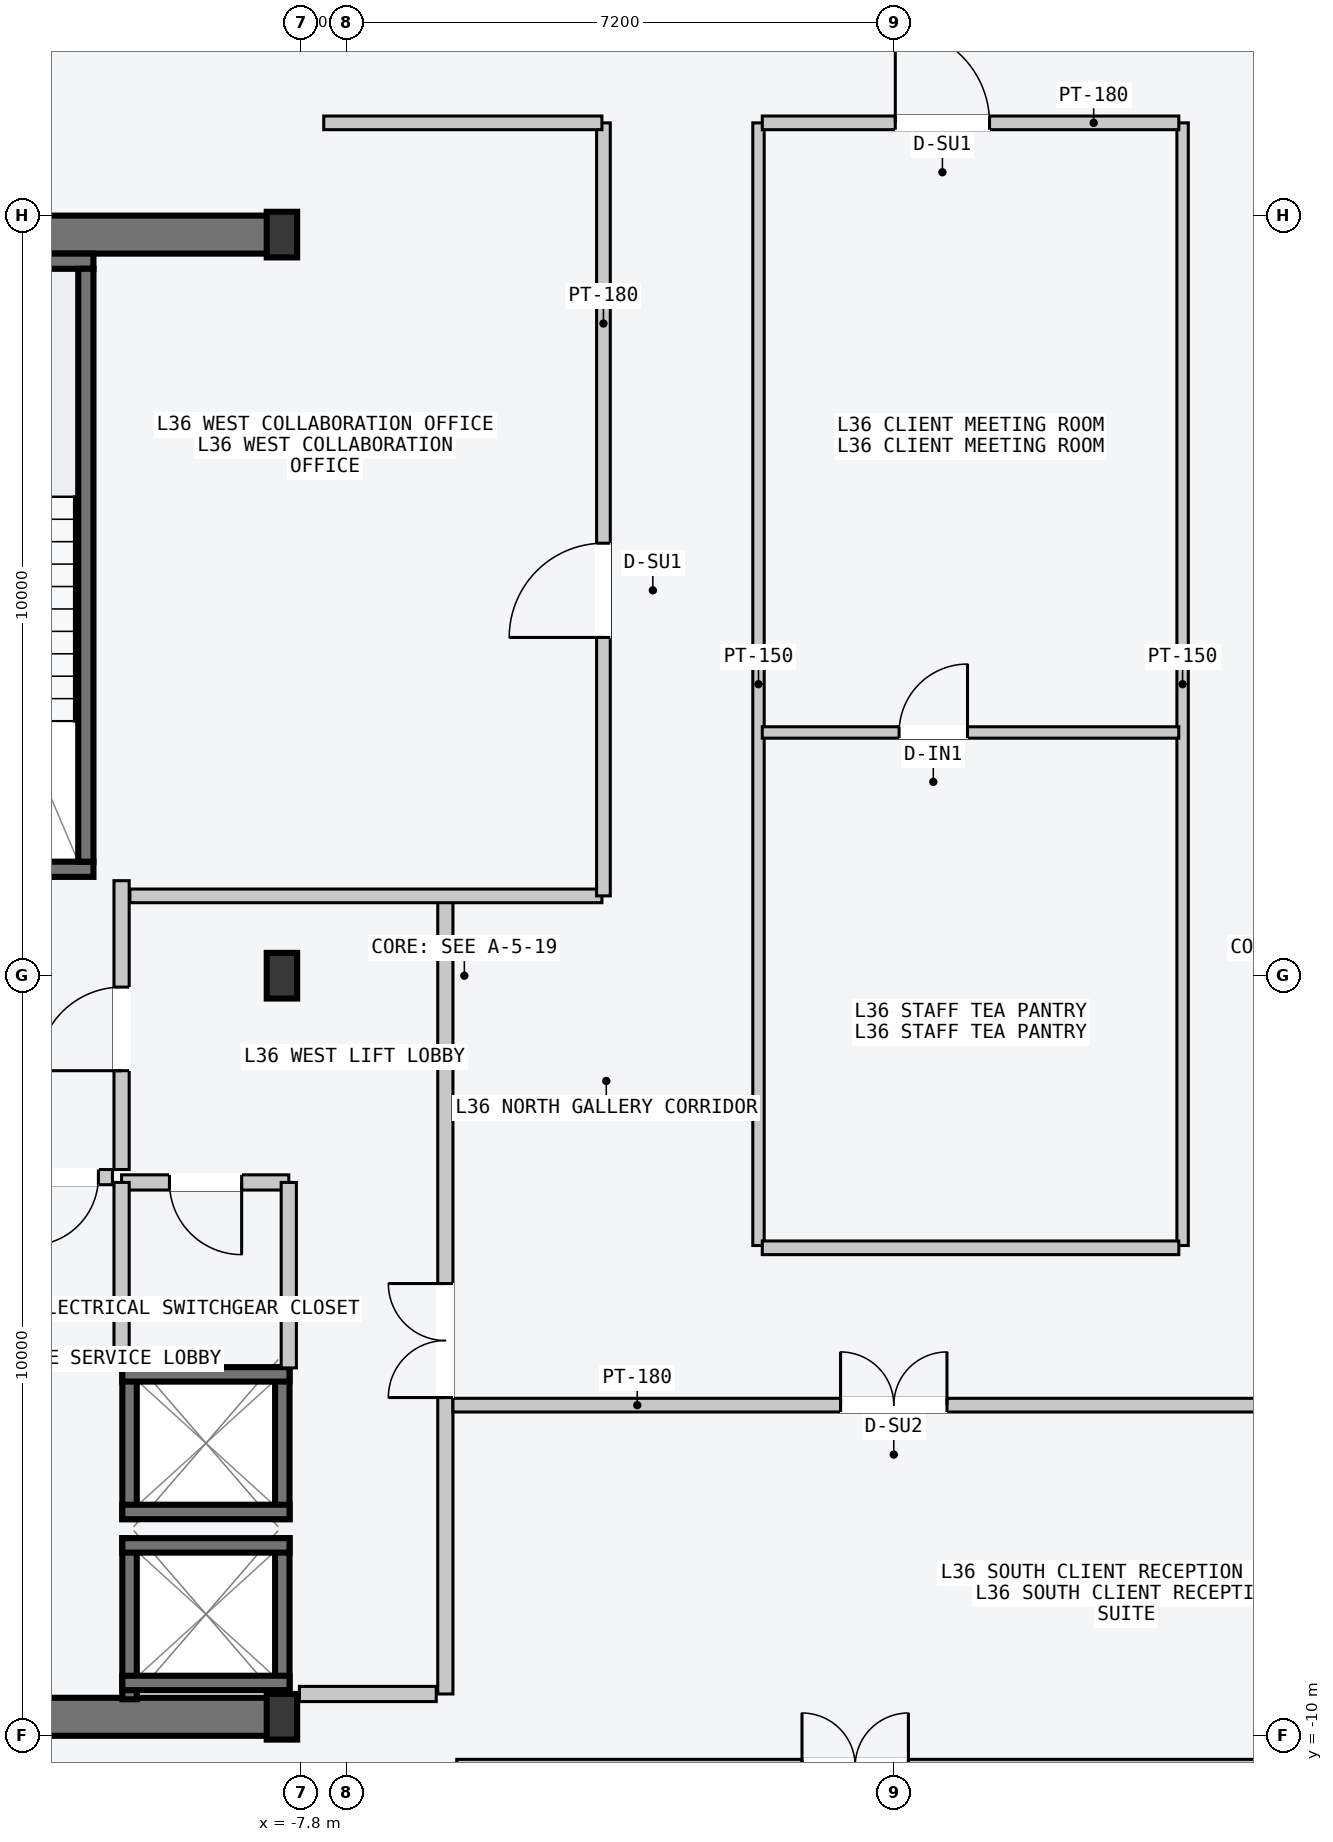
"""IFC4 building model, lengths in metres.
Left out: names, types, materials, properties, quantities, classifications, styles, units other than length and angle.
Written with IfcOpenShell. Run it as: python <this file> out.ifc"""

import sys

from ifc_helpers import new_model, si_unit, direction, frame, frame_2d, origin, origin_2d, place, context, subcontext, project, spatial, rectangle, i_section, extrude, element, fill, save


model = new_model("IFC4")
c1 = context("Model", 3, precision=1e-05, world=origin(), true_north=direction((0.0, 1.0)))
c2 = subcontext(c1, "Body", "Model", "MODEL_VIEW")
j1 = project(units=[si_unit("LENGTHUNIT", "METRE"), si_unit("PLANEANGLEUNIT", "RADIAN")], contexts=[c1])
p1 = place(None, origin())
s1 = spatial("IfcSite", under=j1, at=p1, CompositionType="ELEMENT")
p2 = place(p1, origin())
s2 = spatial("IfcBuilding", under=s1, at=p2, CompositionType="ELEMENT")
p3 = place(p2, frame((0.0, 0.0, 138.6)))
s3 = spatial("IfcBuildingStorey", under=s2, at=p3, CompositionType="ELEMENT", Elevation=138.6)
for number, where, z_axis, x_axis in (
    (1, (-14.53, -9.75, -0.2), (0.0, 0.0, 1.0), (1.0, 0.0, 0.0)),
    (2, (-14.53, 9.75, -0.2), (0.0, 0.0, 1.0), (1.0, 0.0, 0.0)),
):
    element("IfcWall", number, at=place(p3, frame(where, z_axis=z_axis, x_axis=x_axis)), inside=s3, PredefinedType="SHEAR", context=c2, shape_type="SweptSolid", body=[
        extrude(rectangle(XDim=6.46, YDim=0.5, at=frame_2d((3.23, 0.0))), origin(), (0.0, 0.0, 1.0), 3.6),
    ])
p4 = place(p3, frame((-14.25, 1.4, -0.2), z_axis=(0.0, 0.0, 1.0), x_axis=(1.0, 0.0, 0.0)))
e3 = element("IfcWall", 3, at=p4, inside=s3, PredefinedType="SOLIDWALL", context=c2, shape_type="SweptSolid", body=[
    extrude(rectangle(XDim=3.72, YDim=0.2, at=frame_2d((1.86, 0.0))), origin(), (0.0, 0.0, 1.0), 3.6),
])
p5 = place(p4, frame((1.5, 0.0, 0.2)))
e4 = element("IfcOpeningElement", 4, at=p5, cuts=e3, PredefinedType="OPENING", context=c2, shape_type="SweptSolid", body=[
    extrude(rectangle(XDim=1.12, YDim=2.18, at=frame_2d((0.56, 1.09))), frame((0.0, 0.11, 0.0), z_axis=(0.0, -1.0, 0.0), x_axis=(1.0, 0.0, 0.0)), (0.0, 0.0, 1.0), 0.22),
])
p6 = place(p3, frame((-14.25, 9.4, -0.2), z_axis=(0.0, 0.0, 1.0), x_axis=(1.0, 0.0, 0.0)))
e5 = element("IfcWall", 5, at=p6, inside=s3, PredefinedType="SOLIDWALL", context=c2, shape_type="SweptSolid", body=[
    extrude(rectangle(XDim=3.72, YDim=0.2, at=frame_2d((1.86, 0.0))), origin(), (0.0, 0.0, 1.0), 3.6),
])
p7 = place(p3, frame((-10.63, 1.5, -0.2), z_axis=(0.0, 0.0, 1.0), x_axis=(0.0, 1.0, 0.0)))
e6 = element("IfcWall", 6, at=p7, inside=s3, PredefinedType="SOLIDWALL", context=c2, shape_type="SweptSolid", body=[
    extrude(rectangle(XDim=7.8, YDim=0.2, at=frame_2d((3.9, 0.0))), origin(), (0.0, 0.0, 1.0), 3.6),
])
for number, where, z_axis, x_axis in (
    (7, (-8.05, -9.75, 0.0), (0.0, 0.0, 1.0), (1.0, 0.0, 0.0)),
    (8, (-8.05, 0.0, 0.0), (0.0, 0.0, 1.0), (1.0, 0.0, 0.0)),
    (9, (-8.05, 9.75, 0.0), (0.0, 0.0, 1.0), (1.0, 0.0, 0.0)),
):
    element("IfcColumn", number, at=place(p3, frame(where, z_axis=z_axis, x_axis=x_axis)), inside=s3, PredefinedType="COLUMN", context=c2, shape_type="SweptSolid", body=[
        extrude(i_section(OverallWidth=0.4, OverallDepth=0.6, WebThickness=0.022, FlangeThickness=0.036, at=origin_2d()), origin(), (0.0, 0.0, 1.0), 3.6),
    ])
for number, where, z_axis, x_axis in (
    (10, (-8.045, -9.52, -0.2), (0.0, 0.0, 1.0), (0.0, 1.0, 0.0)),
    (11, (-10.055, -9.52, -0.2), (0.0, 0.0, 1.0), (0.0, 1.0, 0.0)),
):
    element("IfcWall", number, at=place(p3, frame(where, z_axis=z_axis, x_axis=x_axis)), inside=s3, PredefinedType="SOLIDWALL", context=c2, shape_type="SweptSolid", body=[
        extrude(rectangle(XDim=2.12, YDim=0.19, at=frame_2d((1.06, 0.0))), origin(), (0.0, 0.0, 1.0), 3.6),
    ])
for number, where, z_axis, x_axis in (
    (12, (-10.15, -7.495, -0.2), (0.0, 0.0, 1.0), (1.0, 0.0, 0.0)),
    (13, (-10.15, -9.305, -0.2), (0.0, 0.0, 1.0), (1.0, 0.0, 0.0)),
):
    element("IfcWall", number, at=place(p3, frame(where, z_axis=z_axis, x_axis=x_axis)), inside=s3, PredefinedType="SOLIDWALL", context=c2, shape_type="SweptSolid", body=[
        extrude(rectangle(XDim=2.2, YDim=0.19, at=frame_2d((1.1, 0.0))), origin(), (0.0, 0.0, 1.0), 3.6),
    ])
for number, where, z_axis, x_axis in (
    (14, (-8.045, -7.15, -0.2), (0.0, 0.0, 1.0), (0.0, 1.0, 0.0)),
    (15, (-10.055, -7.15, -0.2), (0.0, 0.0, 1.0), (0.0, 1.0, 0.0)),
):
    element("IfcWall", number, at=place(p3, frame(where, z_axis=z_axis, x_axis=x_axis)), inside=s3, PredefinedType="SOLIDWALL", context=c2, shape_type="SweptSolid", body=[
        extrude(rectangle(XDim=2.0, YDim=0.19, at=frame_2d((1.0, 0.0))), origin(), (0.0, 0.0, 1.0), 3.6),
    ])
for number, where, z_axis, x_axis in (
    (16, (-10.15, -5.245, -0.2), (0.0, 0.0, 1.0), (1.0, 0.0, 0.0)),
    (17, (-10.15, -7.055, -0.2), (0.0, 0.0, 1.0), (1.0, 0.0, 0.0)),
):
    element("IfcWall", number, at=place(p3, frame(where, z_axis=z_axis, x_axis=x_axis)), inside=s3, PredefinedType="SOLIDWALL", context=c2, shape_type="SweptSolid", body=[
        extrude(rectangle(XDim=2.2, YDim=0.19, at=frame_2d((1.1, 0.0))), origin(), (0.0, 0.0, 1.0), 3.6),
    ])
p8 = place(p3, frame((-5.9, -9.45, 0.0), z_axis=(0.0, 0.0, 1.0), x_axis=(0.0, 1.0, 0.0)))
e18 = element("IfcWall", 18, at=p8, inside=s3, PredefinedType="PARTITIONING", context=c2, shape_type="SweptSolid", body=[
    extrude(rectangle(XDim=10.5, YDim=0.2, at=frame_2d((5.25, 0.0))), origin(), (0.0, 0.0, 1.0), 3.4),
])
p9 = place(p8, frame((3.9, 0.0, 0.0)))
e19 = element("IfcOpeningElement", 19, at=p9, cuts=e18, PredefinedType="OPENING", context=c2, shape_type="SweptSolid", body=[
    extrude(rectangle(XDim=1.5, YDim=2.2, at=frame_2d((0.75, 1.1))), frame((0.0, 0.11, 0.0), z_axis=(0.0, -1.0, 0.0), x_axis=(1.0, 0.0, 0.0)), (0.0, 0.0, 1.0), 0.22),
])
p10 = place(p3, frame((-6.02, -9.45, 0.0), z_axis=(0.0, 0.0, 1.0), x_axis=(-1.0, 0.0, 0.0)))
e20 = element("IfcWall", 20, at=p10, inside=s3, PredefinedType="PARTITIONING", context=c2, shape_type="SweptSolid", body=[
    extrude(rectangle(XDim=1.8, YDim=0.2, at=frame_2d((0.9, 0.0))), origin(), (0.0, 0.0, 1.0), 3.4),
])
p11 = place(p3, frame((-10.16, -2.55, 0.0), z_axis=(0.0, 0.0, 1.0), x_axis=(0.0, 1.0, 0.0)))
e21 = element("IfcWall", 21, at=p11, inside=s3, PredefinedType="PARTITIONING", context=c2, shape_type="SweptSolid", body=[
    extrude(rectangle(XDim=3.8, YDim=0.2, at=frame_2d((1.9, 0.0))), origin(), (0.0, 0.0, 1.0), 3.4),
])
p12 = place(p11, frame((1.3, 0.0, 0.0)))
e22 = element("IfcOpeningElement", 22, at=p12, cuts=e21, PredefinedType="OPENING", context=c2, shape_type="SweptSolid", body=[
    extrude(rectangle(XDim=1.1, YDim=2.15, at=frame_2d((0.55, 1.075))), frame((0.0, 0.11, 0.0), z_axis=(0.0, -1.0, 0.0), x_axis=(1.0, 0.0, 0.0)), (0.0, 0.0, 1.0), 0.22),
])
p13 = place(p3, frame((-10.28, -2.65, 0.0), z_axis=(0.0, 0.0, 1.0), x_axis=(-1.0, 0.0, 0.0)))
e23 = element("IfcWall", 23, at=p13, inside=s3, PredefinedType="PARTITIONING", context=c2, shape_type="SweptSolid", body=[
    extrude(rectangle(XDim=1.27, YDim=0.2, at=frame_2d((0.635, 0.0))), origin(), (0.0, 0.0, 1.0), 3.4),
])
p14 = place(p13, frame((0.185, 0.0, 0.0)))
e24 = element("IfcOpeningElement", 24, at=p14, cuts=e23, PredefinedType="OPENING", context=c2, shape_type="SweptSolid", body=[
    extrude(rectangle(XDim=0.9, YDim=2.15, at=frame_2d((0.45, 1.075))), frame((0.0, 0.11, 0.0), z_axis=(0.0, -1.0, 0.0), x_axis=(1.0, 0.0, 0.0)), (0.0, 0.0, 1.0), 0.22),
])
p15 = place(p3, frame((-7.96, -2.72, 0.0), z_axis=(0.0, 0.0, 1.0), x_axis=(-1.0, 0.0, 0.0)))
e25 = element("IfcWall", 25, at=p15, inside=s3, PredefinedType="PARTITIONING", context=c2, shape_type="SweptSolid", body=[
    extrude(rectangle(XDim=2.2, YDim=0.2, at=frame_2d((1.1, 0.0))), origin(), (0.0, 0.0, 1.0), 3.4),
])
p16 = place(p15, frame((0.62, 0.0, 0.0)))
e26 = element("IfcOpeningElement", 26, at=p16, cuts=e25, PredefinedType="OPENING", context=c2, shape_type="SweptSolid", body=[
    extrude(rectangle(XDim=0.95, YDim=2.1, at=frame_2d((0.475, 1.05))), frame((0.0, 0.11, 0.0), z_axis=(0.0, -1.0, 0.0), x_axis=(1.0, 0.0, 0.0)), (0.0, 0.0, 1.0), 0.22),
])
for number, where, z_axis, x_axis in (
    (27, (-7.96, -5.16, 0.0), (0.0, 0.0, 1.0), (0.0, 1.0, 0.0)),
    (28, (-10.16, -5.16, 0.0), (0.0, 0.0, 1.0), (0.0, 1.0, 0.0)),
):
    element("IfcWall", number, at=place(p3, frame(where, z_axis=z_axis, x_axis=x_axis)), inside=s3, PredefinedType="PARTITIONING", context=c2, shape_type="SweptSolid", body=[
        extrude(rectangle(XDim=2.44, YDim=0.2, at=frame_2d((1.22, 0.0))), origin(), (0.0, 0.0, 1.0), 3.4),
    ])
p17 = place(p3, frame((-10.05, 1.05, 0.0), z_axis=(0.0, 0.0, 1.0), x_axis=(1.0, 0.0, 0.0)))
e29 = element("IfcWall", 29, at=p17, inside=s3, PredefinedType="PARTITIONING", context=c2, shape_type="SweptSolid", body=[
    extrude(rectangle(XDim=6.21, YDim=0.18, at=frame_2d((3.105, 0.0))), origin(), (0.0, 0.0, 1.0), 3.4),
])
p18 = place(p3, frame((-3.82, 1.05, 0.0), z_axis=(0.0, 0.0, 1.0), x_axis=(0.0, 1.0, 0.0)))
e30 = element("IfcWall", 30, at=p18, inside=s3, PredefinedType="PARTITIONING", context=c2, shape_type="SweptSolid", body=[
    extrude(rectangle(XDim=10.17, YDim=0.18, at=frame_2d((5.085, 0.0))), origin(), (0.0, 0.0, 1.0), 3.4),
])
p19 = place(p18, frame((3.4, 0.0, 0.0)))
e31 = element("IfcOpeningElement", 31, at=p19, cuts=e30, PredefinedType="OPENING", context=c2, shape_type="SweptSolid", body=[
    extrude(rectangle(XDim=1.24, YDim=2.24, at=frame_2d((0.62, 1.12))), frame((0.0, 0.1, 0.0), z_axis=(0.0, -1.0, 0.0), x_axis=(1.0, 0.0, 0.0)), (0.0, 0.0, 1.0), 0.2),
])
p20 = place(p3, frame((-7.5, 11.22, 0.0), z_axis=(0.0, 0.0, 1.0), x_axis=(1.0, 0.0, 0.0)))
e32 = element("IfcWall", 32, at=p20, inside=s3, PredefinedType="PARTITIONING", context=c2, shape_type="SweptSolid", body=[
    extrude(rectangle(XDim=3.66, YDim=0.18, at=frame_2d((1.83, 0.0))), origin(), (0.0, 0.0, 1.0), 3.4),
])
for number, where, z_axis, x_axis in (
    (33, (-1.78, -3.55, 0.0), (0.0, 0.0, 1.0), (0.0, 1.0, 0.0)),
    (34, (3.8, -3.55, 0.0), (0.0, 0.0, 1.0), (0.0, 1.0, 0.0)),
):
    element("IfcWall", number, at=place(p3, frame(where, z_axis=z_axis, x_axis=x_axis)), inside=s3, PredefinedType="PARTITIONING", context=c2, shape_type="SweptSolid", body=[
        extrude(rectangle(XDim=14.77, YDim=0.15, at=frame_2d((7.385, 0.0))), origin(), (0.0, 0.0, 1.0), 3.4),
    ])
p21 = place(p3, frame((-1.73, -3.58, 0.0), z_axis=(0.0, 0.0, 1.0), x_axis=(1.0, 0.0, 0.0)))
e35 = element("IfcWall", 35, at=p21, inside=s3, PredefinedType="PARTITIONING", context=c2, shape_type="SweptSolid", body=[
    extrude(rectangle(XDim=5.48, YDim=0.18, at=frame_2d((2.74, 0.0))), origin(), (0.0, 0.0, 1.0), 3.4),
])
p22 = place(p3, frame((-1.73, 3.2, 0.0), z_axis=(0.0, 0.0, 1.0), x_axis=(1.0, 0.0, 0.0)))
e36 = element("IfcWall", 36, at=p22, inside=s3, PredefinedType="PARTITIONING", context=c2, shape_type="SweptSolid", body=[
    extrude(rectangle(XDim=5.48, YDim=0.15, at=frame_2d((2.74, 0.0))), origin(), (0.0, 0.0, 1.0), 3.4),
])
p23 = place(p22, frame((1.8, 0.0, 0.0)))
e37 = element("IfcOpeningElement", 37, at=p23, cuts=e36, PredefinedType="OPENING", context=c2, shape_type="SweptSolid", body=[
    extrude(rectangle(XDim=0.9, YDim=2.15, at=frame_2d((0.45, 1.075))), frame((0.0, 0.085, 0.0), z_axis=(0.0, -1.0, 0.0), x_axis=(1.0, 0.0, 0.0)), (0.0, 0.0, 1.0), 0.17),
])
p24 = place(p3, frame((-1.73, 11.22, 0.0), z_axis=(0.0, 0.0, 1.0), x_axis=(1.0, 0.0, 0.0)))
e38 = element("IfcWall", 38, at=p24, inside=s3, PredefinedType="PARTITIONING", context=c2, shape_type="SweptSolid", body=[
    extrude(rectangle(XDim=5.48, YDim=0.18, at=frame_2d((2.74, 0.0))), origin(), (0.0, 0.0, 1.0), 3.4),
])
p25 = place(p24, frame((1.75, 0.0, 0.0)))
e39 = element("IfcOpeningElement", 39, at=p25, cuts=e38, PredefinedType="OPENING", context=c2, shape_type="SweptSolid", body=[
    extrude(rectangle(XDim=1.24, YDim=2.24, at=frame_2d((0.62, 1.12))), frame((0.0, 0.1, 0.0), z_axis=(0.0, -1.0, 0.0), x_axis=(1.0, 0.0, 0.0)), (0.0, 0.0, 1.0), 0.2),
])
p26 = place(p3, frame((-5.8, -5.65, 0.0), z_axis=(0.0, 0.0, 1.0), x_axis=(1.0, 0.0, 0.0)))
e40 = element("IfcWall", 40, at=p26, inside=s3, PredefinedType="PARTITIONING", context=c2, shape_type="SweptSolid", body=[
    extrude(rectangle(XDim=11.6, YDim=0.18, at=frame_2d((5.8, 0.0))), origin(), (0.0, 0.0, 1.0), 3.4),
])
p27 = place(p26, frame((5.1, 0.0, 0.0)))
e41 = element("IfcOpeningElement", 41, at=p27, cuts=e40, PredefinedType="OPENING", context=c2, shape_type="SweptSolid", body=[
    extrude(rectangle(XDim=1.4, YDim=2.2, at=frame_2d((0.7, 1.1))), frame((0.0, 0.1, 0.0), z_axis=(0.0, -1.0, 0.0), x_axis=(1.0, 0.0, 0.0)), (0.0, 0.0, 1.0), 0.2),
])
p28 = place(p3, frame((-5.75, -10.4, 0.0), z_axis=(0.0, 0.0, 1.0), x_axis=(1.0, 0.0, 0.0)))
e42 = element("IfcWall", 42, at=p28, inside=s3, PredefinedType="PARTITIONING", context=c2, shape_type="SweptSolid", body=[
    extrude(rectangle(XDim=11.5, YDim=0.18, at=frame_2d((5.75, 0.0))), origin(), (0.0, 0.0, 1.0), 3.4),
])
p29 = place(p28, frame((4.542, 0.0, 0.0)))
e43 = element("IfcOpeningElement", 43, at=p29, cuts=e42, PredefinedType="OPENING", context=c2, shape_type="SweptSolid", body=[
    extrude(rectangle(XDim=1.4, YDim=2.2, at=frame_2d((0.7, 1.1))), frame((0.0, 0.1, 0.0), z_axis=(0.0, -1.0, 0.0), x_axis=(1.0, 0.0, 0.0)), (0.0, 0.0, 1.0), 0.2),
])
p30 = place(p9, origin())
e44 = element("IfcDoor", 44, at=p30, inside=s3, OperationType="DOUBLE_DOOR_SINGLE_SWING", PredefinedType="DOOR", context=c2, shape_type="SweptSolid", body=[
    extrude(rectangle(XDim=1.5, YDim=2.2, at=frame_2d((0.75, 1.1))), frame((0.0, 0.025, 0.0), z_axis=(0.0, -1.0, 0.0), x_axis=(1.0, 0.0, 0.0)), (0.0, 0.0, 1.0), 0.05),
])
fill(e19, e44)
p31 = place(p12, origin())
e45 = element("IfcDoor", 45, at=p31, inside=s3, OperationType="SINGLE_SWING_LEFT", PredefinedType="DOOR", context=c2, shape_type="SweptSolid", body=[
    extrude(rectangle(XDim=1.1, YDim=2.15, at=frame_2d((0.55, 1.075))), frame((0.0, 0.025, 0.0), z_axis=(0.0, -1.0, 0.0), x_axis=(1.0, 0.0, 0.0)), (0.0, 0.0, 1.0), 0.05),
])
fill(e22, e45)
p32 = place(p14, origin())
e46 = element("IfcDoor", 46, at=p32, inside=s3, OperationType="SINGLE_SWING_RIGHT", PredefinedType="DOOR", context=c2, shape_type="SweptSolid", body=[
    extrude(rectangle(XDim=0.9, YDim=2.15, at=frame_2d((0.45, 1.075))), frame((0.0, 0.025, 0.0), z_axis=(0.0, -1.0, 0.0), x_axis=(1.0, 0.0, 0.0)), (0.0, 0.0, 1.0), 0.05),
])
fill(e24, e46)
p33 = place(p16, origin())
e47 = element("IfcDoor", 47, at=p33, inside=s3, OperationType="SINGLE_SWING_LEFT", PredefinedType="DOOR", context=c2, shape_type="SweptSolid", body=[
    extrude(rectangle(XDim=0.95, YDim=2.1, at=frame_2d((0.475, 1.05))), frame((0.0, 0.025, 0.0), z_axis=(0.0, -1.0, 0.0), x_axis=(1.0, 0.0, 0.0)), (0.0, 0.0, 1.0), 0.05),
])
fill(e26, e47)
p34 = place(p19, origin())
e48 = element("IfcDoor", 48, at=p34, inside=s3, OperationType="SINGLE_SWING_LEFT", PredefinedType="DOOR", context=c2, shape_type="SweptSolid", body=[
    extrude(rectangle(XDim=1.24, YDim=2.24, at=frame_2d((0.62, 1.12))), frame((0.0, 0.025, 0.0), z_axis=(0.0, -1.0, 0.0), x_axis=(1.0, 0.0, 0.0)), (0.0, 0.0, 1.0), 0.05),
])
fill(e31, e48)
p35 = place(p23, origin())
e49 = element("IfcDoor", 49, at=p35, inside=s3, OperationType="SINGLE_SWING_RIGHT", PredefinedType="DOOR", context=c2, shape_type="SweptSolid", body=[
    extrude(rectangle(XDim=0.9, YDim=2.15, at=frame_2d((0.45, 1.075))), frame((0.0, 0.025, 0.0), z_axis=(0.0, -1.0, 0.0), x_axis=(1.0, 0.0, 0.0)), (0.0, 0.0, 1.0), 0.05),
])
fill(e37, e49)
p36 = place(p25, origin())
e50 = element("IfcDoor", 50, at=p36, inside=s3, OperationType="SINGLE_SWING_LEFT", PredefinedType="DOOR", context=c2, shape_type="SweptSolid", body=[
    extrude(rectangle(XDim=1.24, YDim=2.24, at=frame_2d((0.62, 1.12))), frame((0.0, 0.025, 0.0), z_axis=(0.0, -1.0, 0.0), x_axis=(1.0, 0.0, 0.0)), (0.0, 0.0, 1.0), 0.05),
])
fill(e39, e50)
p37 = place(p27, origin())
e51 = element("IfcDoor", 51, at=p37, inside=s3, OperationType="DOUBLE_DOOR_SINGLE_SWING", PredefinedType="DOOR", context=c2, shape_type="SweptSolid", body=[
    extrude(rectangle(XDim=1.4, YDim=2.2, at=frame_2d((0.7, 1.1))), frame((0.0, 0.025, 0.0), z_axis=(0.0, -1.0, 0.0), x_axis=(1.0, 0.0, 0.0)), (0.0, 0.0, 1.0), 0.05),
])
fill(e41, e51)
save(model, sys.argv[1])
